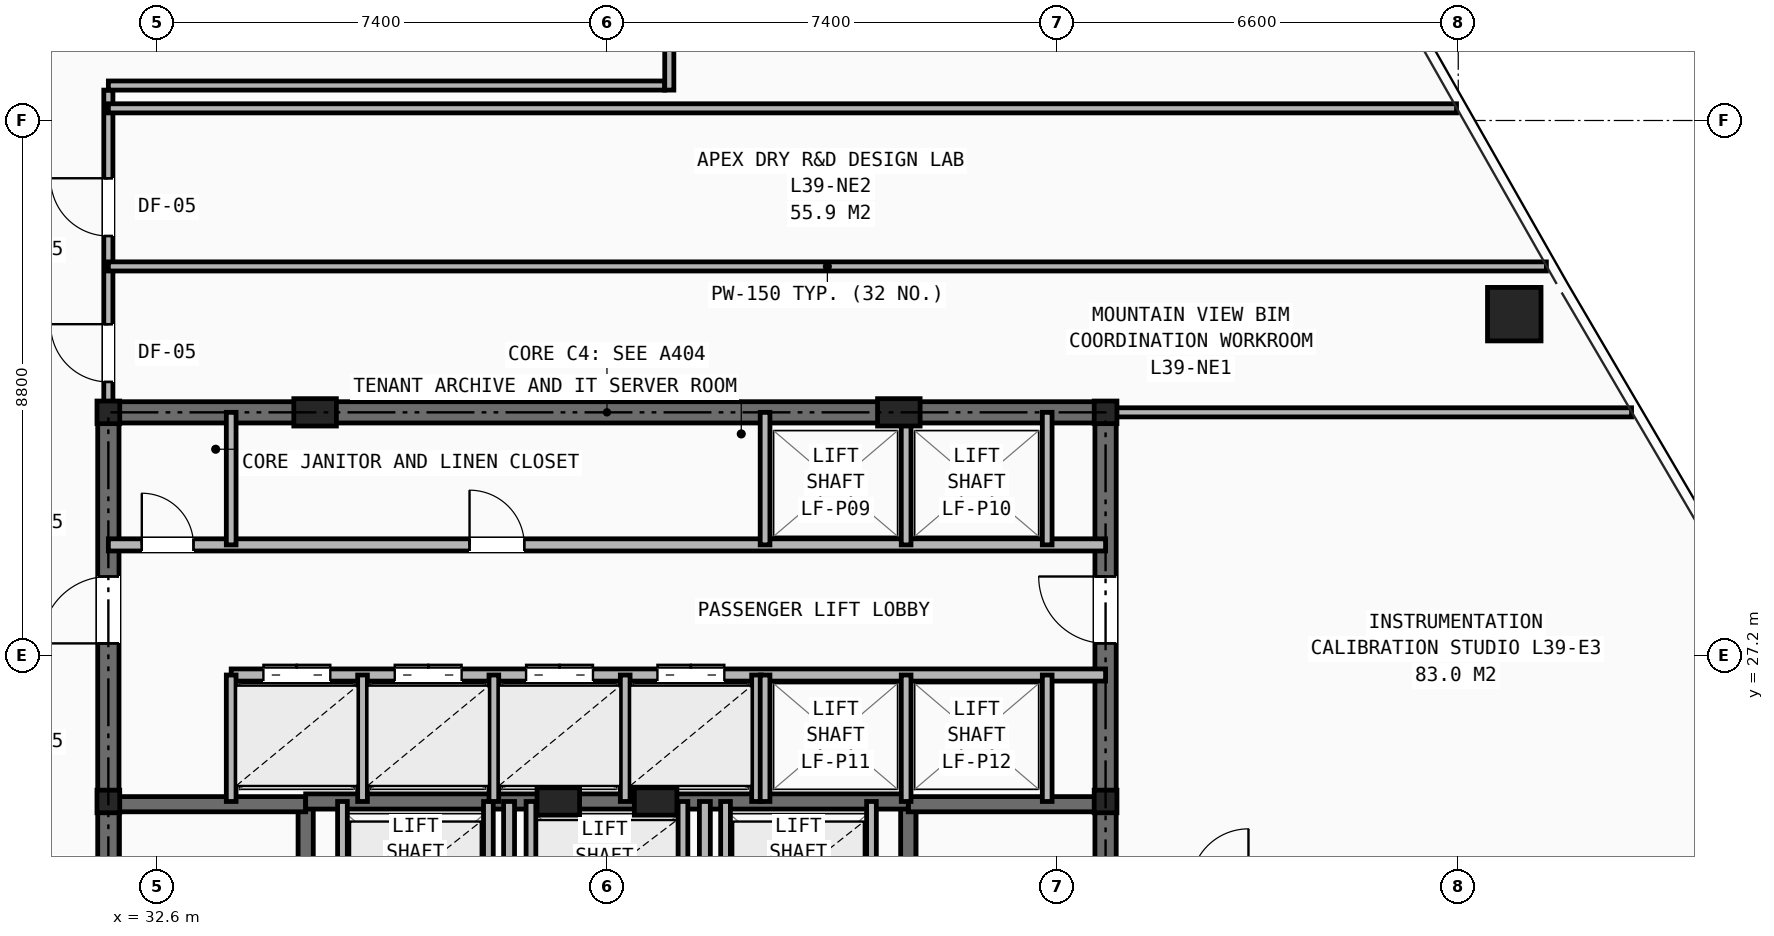
"""IFC4 building model, lengths in metres.
Left out: names, types, materials, properties, quantities, classifications, styles, units other than length and angle.
Written with IfcOpenShell. Run it as: python <this file> out.ifc"""

import sys

from ifc_helpers import new_model, si_unit, direction, frame, frame_2d, origin, origin_2d, place, context, subcontext, project, spatial, rectangle, hollow_rectangle, i_section, extrude, element, fill, save


model = new_model("IFC4")
c1 = context("Model", 3, precision=1e-05, world=origin(), true_north=direction((0.0, 1.0)))
c2 = subcontext(c1, "Body", "Model", "MODEL_VIEW")
j1 = project(units=[si_unit("LENGTHUNIT", "METRE"), si_unit("PLANEANGLEUNIT", "RADIAN")], contexts=[c1])
p1 = place(None, origin())
s1 = spatial("IfcSite", under=j1, at=p1, CompositionType="ELEMENT")
p2 = place(p1, origin())
s2 = spatial("IfcBuilding", under=s1, at=p2, CompositionType="ELEMENT")
p3 = place(p2, frame((0.0, 0.0, 136.7)))
s3 = spatial("IfcBuildingStorey", under=s2, at=p3, CompositionType="ELEMENT", Elevation=136.7)
for number, where, z_axis, x_axis in (
    (1, (31.8, 24.8, 0.0), (0.0, 0.0, 1.0), (1.0, 0.0, 0.0)),
    (2, (48.2, 24.8, 0.0), (0.0, 0.0, 1.0), (1.0, 0.0, 0.0)),
    (3, (31.8, 31.2, 0.0), (0.0, 0.0, 1.0), (1.0, 0.0, 0.0)),
    (4, (48.2, 31.2, 0.0), (0.0, 0.0, 1.0), (1.0, 0.0, 0.0)),
):
    element("IfcColumn", number, at=place(p3, frame(where, z_axis=z_axis, x_axis=x_axis)), inside=s3, PredefinedType="COLUMN", context=c2, shape_type="SweptSolid", body=[
        extrude(i_section(OverallWidth=0.374, OverallDepth=0.372, WebThickness=0.016, FlangeThickness=0.026, at=origin_2d()), origin(), (0.0, 0.0, 1.0), 3.45),
    ])
for number, where, z_axis, x_axis in (
    (5, (35.2, 31.2, 0.0), (0.0, 0.0, 1.0), (1.0, 0.0, 0.0)),
    (6, (44.8, 31.2, 0.0), (0.0, 0.0, 1.0), (1.0, 0.0, 0.0)),
    (7, (39.2, 24.8, 0.0), (0.0, 0.0, 1.0), (1.0, 0.0, 0.0)),
    (8, (40.8, 24.8, 0.0), (0.0, 0.0, 1.0), (1.0, 0.0, 0.0)),
):
    element("IfcColumn", number, at=place(p3, frame(where, z_axis=z_axis, x_axis=x_axis)), inside=s3, PredefinedType="PILASTER", context=c2, shape_type="SweptSolid", body=[
        extrude(rectangle(XDim=0.7, YDim=0.45, at=origin_2d()), origin(), (0.0, 0.0, 1.0), 3.45),
    ])
p4 = place(p3, frame((54.921, 32.815, 0.0), z_axis=(0.0, 0.0, 1.0), x_axis=(1.0, 0.0, 0.0)))
e9 = element("IfcColumn", 9, at=p4, inside=s3, PredefinedType="COLUMN", context=c2, shape_type="SweptSolid", body=[
    extrude(hollow_rectangle(XDim=0.88, YDim=0.88, WallThickness=0.06, at=origin_2d()), origin(), (0.0, 0.0, 1.0), 3.45),
])
p5 = place(p3, frame((31.8, 31.2, 0.0), z_axis=(0.0, 0.0, 1.0), x_axis=(1.0, 0.0, 0.0)))
e10 = element("IfcWall", 10, at=p5, inside=s3, PredefinedType="SHEAR", context=c2, shape_type="SweptSolid", body=[
    extrude(rectangle(XDim=16.4, YDim=0.35, at=frame_2d((8.2, 0.0))), origin(), (0.0, 0.0, 1.0), 3.21),
])
p6 = place(p3, frame((31.8, 16.4, 0.0), z_axis=(0.0, 0.0, 1.0), x_axis=(0.0, 1.0, 0.0)))
e11 = element("IfcWall", 11, at=p6, inside=s3, PredefinedType="SHEAR", context=c2, shape_type="SweptSolid", body=[
    extrude(rectangle(XDim=14.8, YDim=0.35, at=frame_2d((7.4, 0.0))), origin(), (0.0, 0.0, 1.0), 3.21),
])
p7 = place(p6, frame((11.0, 0.0, 0.0)))
e12 = element("IfcOpeningElement", 12, at=p7, cuts=e11, PredefinedType="OPENING", context=c2, shape_type="SweptSolid", body=[
    extrude(rectangle(XDim=1.1, YDim=2.15, at=frame_2d((0.55, 1.075))), frame((0.0, 0.185, 0.0), z_axis=(0.0, -1.0, 0.0), x_axis=(1.0, 0.0, 0.0)), (0.0, 0.0, 1.0), 0.37),
])
p8 = place(p3, frame((48.2, 16.4, 0.0), z_axis=(0.0, 0.0, 1.0), x_axis=(0.0, 1.0, 0.0)))
e13 = element("IfcWall", 13, at=p8, inside=s3, PredefinedType="SHEAR", context=c2, shape_type="SweptSolid", body=[
    extrude(rectangle(XDim=14.8, YDim=0.35, at=frame_2d((7.4, 0.0))), origin(), (0.0, 0.0, 1.0), 3.21),
])
p9 = place(p8, frame((11.0, 0.0, 0.0)))
e14 = element("IfcOpeningElement", 14, at=p9, cuts=e13, PredefinedType="OPENING", context=c2, shape_type="SweptSolid", body=[
    extrude(rectangle(XDim=1.1, YDim=2.15, at=frame_2d((0.55, 1.075))), frame((0.0, 0.185, 0.0), z_axis=(0.0, -1.0, 0.0), x_axis=(1.0, 0.0, 0.0)), (0.0, 0.0, 1.0), 0.37),
])
p10 = place(p3, frame((35.045, 16.4, 0.0), z_axis=(0.0, 0.0, 1.0), x_axis=(0.0, 1.0, 0.0)))
e15 = element("IfcWall", 15, at=p10, inside=s3, PredefinedType="SHEAR", context=c2, shape_type="SweptSolid", body=[
    extrude(rectangle(XDim=8.4, YDim=0.25, at=frame_2d((4.2, 0.0))), origin(), (0.0, 0.0, 1.0), 3.21),
])
p11 = place(p10, frame((0.45, 0.0, 0.0)))
e16 = element("IfcOpeningElement", 16, at=p11, cuts=e15, PredefinedType="OPENING", context=c2, shape_type="SweptSolid", body=[
    extrude(rectangle(XDim=0.95, YDim=2.1, at=frame_2d((0.475, 1.05))), frame((0.0, 0.135, 0.0), z_axis=(0.0, -1.0, 0.0), x_axis=(1.0, 0.0, 0.0)), (0.0, 0.0, 1.0), 0.27),
])
p12 = place(p3, frame((31.8, 24.755, 0.0), z_axis=(0.0, 0.0, 1.0), x_axis=(1.0, 0.0, 0.0)))
e17 = element("IfcWall", 17, at=p12, inside=s3, PredefinedType="SHEAR", context=c2, shape_type="SweptSolid", body=[
    extrude(rectangle(XDim=3.245, YDim=0.25, at=frame_2d((1.623, 0.0))), origin(), (0.0, 0.0, 1.0), 3.21),
])
p13 = place(p3, frame((44.955, 16.4, 0.0), z_axis=(0.0, 0.0, 1.0), x_axis=(0.0, 1.0, 0.0)))
e18 = element("IfcWall", 18, at=p13, inside=s3, PredefinedType="SHEAR", context=c2, shape_type="SweptSolid", body=[
    extrude(rectangle(XDim=8.4, YDim=0.25, at=frame_2d((4.2, 0.0))), origin(), (0.0, 0.0, 1.0), 3.21),
])
p14 = place(p13, frame((0.45, 0.0, 0.0)))
e19 = element("IfcOpeningElement", 19, at=p14, cuts=e18, PredefinedType="OPENING", context=c2, shape_type="SweptSolid", body=[
    extrude(rectangle(XDim=0.95, YDim=2.1, at=frame_2d((0.475, 1.05))), frame((0.0, 0.135, 0.0), z_axis=(0.0, -1.0, 0.0), x_axis=(1.0, 0.0, 0.0)), (0.0, 0.0, 1.0), 0.27),
])
p15 = place(p3, frame((44.955, 24.755, 0.0), z_axis=(0.0, 0.0, 1.0), x_axis=(1.0, 0.0, 0.0)))
e20 = element("IfcWall", 20, at=p15, inside=s3, PredefinedType="SHEAR", context=c2, shape_type="SweptSolid", body=[
    extrude(rectangle(XDim=3.245, YDim=0.25, at=frame_2d((1.623, 0.0))), origin(), (0.0, 0.0, 1.0), 3.21),
])
p16 = place(p3, frame((35.045, 24.8, 0.0), z_axis=(0.0, 0.0, 1.0), x_axis=(1.0, 0.0, 0.0)))
e21 = element("IfcWall", 21, at=p16, inside=s3, PredefinedType="SHEAR", context=c2, shape_type="SweptSolid", body=[
    extrude(rectangle(XDim=9.91, YDim=0.25, at=frame_2d((4.955, 0.0))), origin(), (0.0, 0.0, 1.0), 3.21),
])
p17 = place(p3, frame((38.39, 16.4, 0.0), z_axis=(0.0, 0.0, 1.0), x_axis=(0.0, 1.0, 0.0)))
e22 = element("IfcWall", 22, at=p17, inside=s3, PredefinedType="PARTITIONING", context=c2, shape_type="SweptSolid", body=[
    extrude(rectangle(XDim=8.4, YDim=0.18, at=frame_2d((4.2, 0.0))), origin(), (0.0, 0.0, 1.0), 2.661),
])
p18 = place(p17, frame((3.8, 0.0, 0.0)))
e23 = element("IfcOpeningElement", 23, at=p18, cuts=e22, PredefinedType="OPENING", context=c2, shape_type="SweptSolid", body=[
    extrude(rectangle(XDim=0.95, YDim=2.1, at=frame_2d((0.475, 1.05))), frame((0.0, 0.1, 0.0), z_axis=(0.0, -1.0, 0.0), x_axis=(1.0, 0.0, 0.0)), (0.0, 0.0, 1.0), 0.2),
])
p19 = place(p3, frame((41.61, 16.4, 0.0), z_axis=(0.0, 0.0, 1.0), x_axis=(0.0, 1.0, 0.0)))
e24 = element("IfcWall", 24, at=p19, inside=s3, PredefinedType="PARTITIONING", context=c2, shape_type="SweptSolid", body=[
    extrude(rectangle(XDim=8.4, YDim=0.18, at=frame_2d((4.2, 0.0))), origin(), (0.0, 0.0, 1.0), 2.661),
])
for number, where, z_axis, x_axis in (
    (25, (35.65, 22.48, 0.0), (0.0, 0.0, 1.0), (0.0, 1.0, 0.0)),
    (26, (38.05, 22.48, 0.0), (0.0, 0.0, 1.0), (0.0, 1.0, 0.0)),
    (27, (41.95, 22.48, 0.0), (0.0, 0.0, 1.0), (0.0, 1.0, 0.0)),
    (28, (44.35, 22.48, 0.0), (0.0, 0.0, 1.0), (0.0, 1.0, 0.0)),
    (29, (38.75, 22.48, 0.0), (0.0, 0.0, 1.0), (0.0, 1.0, 0.0)),
    (30, (41.25, 22.48, 0.0), (0.0, 0.0, 1.0), (0.0, 1.0, 0.0)),
):
    element("IfcWall", number, at=place(p3, frame(where, z_axis=z_axis, x_axis=x_axis)), inside=s3, PredefinedType="SOLIDWALL", context=c2, shape_type="SweptSolid", body=[
        extrude(rectangle(XDim=2.32, YDim=0.16, at=frame_2d((1.16, 0.0))), origin(), (0.0, 0.0, 1.0), 3.21),
    ])
p20 = place(p3, frame((31.8, 29.02, 0.0), z_axis=(0.0, 0.0, 1.0), x_axis=(1.0, 0.0, 0.0)))
e31 = element("IfcWall", 31, at=p20, inside=s3, PredefinedType="SOLIDWALL", context=c2, shape_type="SweptSolid", body=[
    extrude(rectangle(XDim=16.4, YDim=0.2, at=frame_2d((8.2, 0.0))), origin(), (0.0, 0.0, 1.0), 2.661),
])
p21 = place(p20, frame((0.55, 0.0, 0.0)))
e32 = element("IfcOpeningElement", 32, at=p21, cuts=e31, PredefinedType="OPENING", context=c2, shape_type="SweptSolid", body=[
    extrude(rectangle(XDim=0.85, YDim=2.05, at=frame_2d((0.425, 1.025))), frame((0.0, 0.11, 0.0), z_axis=(0.0, -1.0, 0.0), x_axis=(1.0, 0.0, 0.0)), (0.0, 0.0, 1.0), 0.22),
])
p22 = place(p20, frame((5.94, 0.0, 0.0)))
e33 = element("IfcOpeningElement", 33, at=p22, cuts=e31, PredefinedType="OPENING", context=c2, shape_type="SweptSolid", body=[
    extrude(rectangle(XDim=0.9, YDim=2.1, at=frame_2d((0.45, 1.05))), frame((0.0, 0.11, 0.0), z_axis=(0.0, -1.0, 0.0), x_axis=(1.0, 0.0, 0.0)), (0.0, 0.0, 1.0), 0.22),
])
p23 = place(p3, frame((33.82, 26.88, 0.0), z_axis=(0.0, 0.0, 1.0), x_axis=(1.0, 0.0, 0.0)))
e34 = element("IfcWall", 34, at=p23, inside=s3, PredefinedType="SOLIDWALL", context=c2, shape_type="SweptSolid", body=[
    extrude(rectangle(XDim=14.38, YDim=0.2, at=frame_2d((7.19, 0.0))), origin(), (0.0, 0.0, 1.0), 2.661),
])
p24 = place(p23, frame((0.53, 0.0, 0.0)))
e35 = element("IfcOpeningElement", 35, at=p24, cuts=e34, PredefinedType="OPENING", context=c2, shape_type="SweptSolid", body=[
    extrude(rectangle(XDim=1.1, YDim=2.15, at=frame_2d((0.55, 1.075))), frame((0.0, 0.11, 0.0), z_axis=(0.0, -1.0, 0.0), x_axis=(1.0, 0.0, 0.0)), (0.0, 0.0, 1.0), 0.22),
])
p25 = place(p23, frame((2.69, 0.0, 0.0)))
e36 = element("IfcOpeningElement", 36, at=p25, cuts=e34, PredefinedType="OPENING", context=c2, shape_type="SweptSolid", body=[
    extrude(rectangle(XDim=1.1, YDim=2.15, at=frame_2d((0.55, 1.075))), frame((0.0, 0.11, 0.0), z_axis=(0.0, -1.0, 0.0), x_axis=(1.0, 0.0, 0.0)), (0.0, 0.0, 1.0), 0.22),
])
p26 = place(p23, frame((4.85, 0.0, 0.0)))
e37 = element("IfcOpeningElement", 37, at=p26, cuts=e34, PredefinedType="OPENING", context=c2, shape_type="SweptSolid", body=[
    extrude(rectangle(XDim=1.1, YDim=2.15, at=frame_2d((0.55, 1.075))), frame((0.0, 0.11, 0.0), z_axis=(0.0, -1.0, 0.0), x_axis=(1.0, 0.0, 0.0)), (0.0, 0.0, 1.0), 0.22),
])
p27 = place(p23, frame((7.01, 0.0, 0.0)))
e38 = element("IfcOpeningElement", 38, at=p27, cuts=e34, PredefinedType="OPENING", context=c2, shape_type="SweptSolid", body=[
    extrude(rectangle(XDim=1.1, YDim=2.15, at=frame_2d((0.55, 1.075))), frame((0.0, 0.11, 0.0), z_axis=(0.0, -1.0, 0.0), x_axis=(1.0, 0.0, 0.0)), (0.0, 0.0, 1.0), 0.22),
])
p28 = place(p3, frame((33.82, 29.02, 0.0), z_axis=(0.0, 0.0, 1.0), x_axis=(0.0, 1.0, 0.0)))
e39 = element("IfcWall", 39, at=p28, inside=s3, PredefinedType="SOLIDWALL", context=c2, shape_type="SweptSolid", body=[
    extrude(rectangle(XDim=2.18, YDim=0.16, at=frame_2d((1.09, 0.0))), origin(), (0.0, 0.0, 1.0), 2.661),
])
for number, where, z_axis, x_axis in (
    (40, (33.82, 24.8, 0.0), (0.0, 0.0, 1.0), (0.0, 1.0, 0.0)),
    (41, (35.98, 24.8, 0.0), (0.0, 0.0, 1.0), (0.0, 1.0, 0.0)),
    (42, (38.14, 24.8, 0.0), (0.0, 0.0, 1.0), (0.0, 1.0, 0.0)),
    (43, (40.3, 24.8, 0.0), (0.0, 0.0, 1.0), (0.0, 1.0, 0.0)),
    (44, (42.46, 24.8, 0.0), (0.0, 0.0, 1.0), (0.0, 1.0, 0.0)),
):
    element("IfcWall", number, at=place(p3, frame(where, z_axis=z_axis, x_axis=x_axis)), inside=s3, PredefinedType="SOLIDWALL", context=c2, shape_type="SweptSolid", body=[
        extrude(rectangle(XDim=2.08, YDim=0.16, at=frame_2d((1.04, 0.0))), origin(), (0.0, 0.0, 1.0), 3.21),
    ])
for number, where, z_axis, x_axis in (
    (45, (42.6, 29.02, 0.0), (0.0, 0.0, 1.0), (0.0, 1.0, 0.0)),
    (46, (44.92, 29.02, 0.0), (0.0, 0.0, 1.0), (0.0, 1.0, 0.0)),
    (47, (47.24, 29.02, 0.0), (0.0, 0.0, 1.0), (0.0, 1.0, 0.0)),
):
    element("IfcWall", number, at=place(p3, frame(where, z_axis=z_axis, x_axis=x_axis)), inside=s3, PredefinedType="SOLIDWALL", context=c2, shape_type="SweptSolid", body=[
        extrude(rectangle(XDim=2.18, YDim=0.16, at=frame_2d((1.09, 0.0))), origin(), (0.0, 0.0, 1.0), 2.661),
    ])
for number, where, z_axis, x_axis in (
    (48, (42.6, 24.8, 0.0), (0.0, 0.0, 1.0), (0.0, 1.0, 0.0)),
    (49, (44.92, 24.8, 0.0), (0.0, 0.0, 1.0), (0.0, 1.0, 0.0)),
    (50, (47.24, 24.8, 0.0), (0.0, 0.0, 1.0), (0.0, 1.0, 0.0)),
):
    element("IfcWall", number, at=place(p3, frame(where, z_axis=z_axis, x_axis=x_axis)), inside=s3, PredefinedType="SOLIDWALL", context=c2, shape_type="SweptSolid", body=[
        extrude(rectangle(XDim=2.08, YDim=0.16, at=frame_2d((1.04, 0.0))), origin(), (0.0, 0.0, 1.0), 3.21),
    ])
p29 = place(p3, frame((31.8, 31.2, 0.0), z_axis=(0.0, 0.0, 1.0), x_axis=(0.0, 1.0, 0.0)))
e51 = element("IfcWall", 51, at=p29, inside=s3, PredefinedType="PARTITIONING", context=c2, shape_type="SweptSolid", body=[
    extrude(rectangle(XDim=5.3, YDim=0.15, at=frame_2d((2.65, 0.0))), origin(), (0.0, 0.0, 1.0), 2.225),
])
p30 = place(p29, frame((0.5, 0.0, 0.0)))
e52 = element("IfcOpeningElement", 52, at=p30, cuts=e51, PredefinedType="OPENING", context=c2, shape_type="SweptSolid", body=[
    extrude(rectangle(XDim=0.95, YDim=2.1, at=frame_2d((0.475, 1.05))), frame((0.0, 0.085, 0.0), z_axis=(0.0, -1.0, 0.0), x_axis=(1.0, 0.0, 0.0)), (0.0, 0.0, 1.0), 0.17),
])
p31 = place(p29, frame((2.9, 0.0, 0.0)))
e53 = element("IfcOpeningElement", 53, at=p31, cuts=e51, PredefinedType="OPENING", context=c2, shape_type="SweptSolid", body=[
    extrude(rectangle(XDim=0.95, YDim=2.1, at=frame_2d((0.475, 1.05))), frame((0.0, 0.085, 0.0), z_axis=(0.0, -1.0, 0.0), x_axis=(1.0, 0.0, 0.0)), (0.0, 0.0, 1.0), 0.17),
])
p32 = place(p3, frame((48.2, 31.2, 0.0), z_axis=(0.0, 0.0, 1.0), x_axis=(1.0, 0.0, 0.0)))
e54 = element("IfcWall", 54, at=p32, inside=s3, PredefinedType="PARTITIONING", context=c2, shape_type="SweptSolid", body=[
    extrude(rectangle(XDim=8.65, YDim=0.15, at=frame_2d((4.325, 0.0))), origin(), (0.0, 0.0, 1.0), 2.225),
])
p33 = place(p3, frame((31.8, 33.6, 0.0), z_axis=(0.0, 0.0, 1.0), x_axis=(1.0, 0.0, 0.0)))
e55 = element("IfcWall", 55, at=p33, inside=s3, PredefinedType="PARTITIONING", context=c2, shape_type="SweptSolid", body=[
    extrude(rectangle(XDim=23.649, YDim=0.15, at=frame_2d((11.825, 0.0))), origin(), (0.0, 0.0, 1.0), 2.589),
])
p34 = place(p3, frame((31.8, 36.2, 0.0), z_axis=(0.0, 0.0, 1.0), x_axis=(1.0, 0.0, 0.0)))
e56 = element("IfcWall", 56, at=p34, inside=s3, PredefinedType="PARTITIONING", context=c2, shape_type="SweptSolid", body=[
    extrude(rectangle(XDim=22.172, YDim=0.15, at=frame_2d((11.086, 0.0))), origin(), (0.0, 0.0, 1.0), 2.589),
])
p35 = place(p3, frame((31.8, 36.575, 0.0), z_axis=(0.0, 0.0, 1.0), x_axis=(1.0, 0.0, 0.0)))
e57 = element("IfcWall", 57, at=p35, inside=s3, PredefinedType="PARTITIONING", context=c2, shape_type="SweptSolid", body=[
    extrude(rectangle(XDim=9.15, YDim=0.15, at=frame_2d((4.575, 0.0))), origin(), (0.0, 0.0, 1.0), 3.21),
])
p36 = place(p3, frame((41.025, 36.5, 0.0), z_axis=(0.0, 0.0, 1.0), x_axis=(0.0, 1.0, 0.0)))
e58 = element("IfcWall", 58, at=p36, inside=s3, PredefinedType="PARTITIONING", context=c2, shape_type="SweptSolid", body=[
    extrude(rectangle(XDim=1.95, YDim=0.15, at=frame_2d((0.975, 0.0))), origin(), (0.0, 0.0, 1.0), 3.21),
])
p37 = place(p21, origin())
e59 = element("IfcDoor", 59, at=p37, inside=s3, OperationType="SINGLE_SWING_LEFT", PredefinedType="DOOR", context=c2, shape_type="SweptSolid", body=[
    extrude(rectangle(XDim=0.85, YDim=2.05, at=frame_2d((0.425, 1.025))), frame((0.0, 0.025, 0.0), z_axis=(0.0, -1.0, 0.0), x_axis=(1.0, 0.0, 0.0)), (0.0, 0.0, 1.0), 0.05),
])
fill(e32, e59)
p38 = place(p7, origin())
e60 = element("IfcDoor", 60, at=p38, inside=s3, OperationType="SINGLE_SWING_LEFT", PredefinedType="DOOR", context=c2, shape_type="SweptSolid", body=[
    extrude(rectangle(XDim=1.1, YDim=2.15, at=frame_2d((0.55, 1.075))), frame((0.0, 0.025, 0.0), z_axis=(0.0, -1.0, 0.0), x_axis=(1.0, 0.0, 0.0)), (0.0, 0.0, 1.0), 0.05),
])
fill(e12, e60)
p39 = place(p9, origin())
e61 = element("IfcDoor", 61, at=p39, inside=s3, OperationType="SINGLE_SWING_RIGHT", PredefinedType="DOOR", context=c2, shape_type="SweptSolid", body=[
    extrude(rectangle(XDim=1.1, YDim=2.15, at=frame_2d((0.55, 1.075))), frame((0.0, 0.025, 0.0), z_axis=(0.0, -1.0, 0.0), x_axis=(1.0, 0.0, 0.0)), (0.0, 0.0, 1.0), 0.05),
])
fill(e14, e61)
p40 = place(p22, origin())
e62 = element("IfcDoor", 62, at=p40, inside=s3, OperationType="SINGLE_SWING_LEFT", PredefinedType="DOOR", context=c2, shape_type="SweptSolid", body=[
    extrude(rectangle(XDim=0.9, YDim=2.1, at=frame_2d((0.45, 1.05))), frame((0.0, 0.025, 0.0), z_axis=(0.0, -1.0, 0.0), x_axis=(1.0, 0.0, 0.0)), (0.0, 0.0, 1.0), 0.05),
])
fill(e33, e62)
p41 = place(p24, origin())
e63 = element("IfcDoor", 63, at=p41, inside=s3, OperationType="DOUBLE_DOOR_SLIDING", PredefinedType="DOOR", context=c2, shape_type="SweptSolid", body=[
    extrude(rectangle(XDim=1.1, YDim=2.15, at=frame_2d((0.55, 1.075))), frame((0.0, 0.025, 0.0), z_axis=(0.0, -1.0, 0.0), x_axis=(1.0, 0.0, 0.0)), (0.0, 0.0, 1.0), 0.05),
])
fill(e35, e63)
p42 = place(p25, origin())
e64 = element("IfcDoor", 64, at=p42, inside=s3, OperationType="DOUBLE_DOOR_SLIDING", PredefinedType="DOOR", context=c2, shape_type="SweptSolid", body=[
    extrude(rectangle(XDim=1.1, YDim=2.15, at=frame_2d((0.55, 1.075))), frame((0.0, 0.025, 0.0), z_axis=(0.0, -1.0, 0.0), x_axis=(1.0, 0.0, 0.0)), (0.0, 0.0, 1.0), 0.05),
])
fill(e36, e64)
p43 = place(p26, origin())
e65 = element("IfcDoor", 65, at=p43, inside=s3, OperationType="DOUBLE_DOOR_SLIDING", PredefinedType="DOOR", context=c2, shape_type="SweptSolid", body=[
    extrude(rectangle(XDim=1.1, YDim=2.15, at=frame_2d((0.55, 1.075))), frame((0.0, 0.025, 0.0), z_axis=(0.0, -1.0, 0.0), x_axis=(1.0, 0.0, 0.0)), (0.0, 0.0, 1.0), 0.05),
])
fill(e37, e65)
p44 = place(p27, origin())
e66 = element("IfcDoor", 66, at=p44, inside=s3, OperationType="DOUBLE_DOOR_SLIDING", PredefinedType="DOOR", context=c2, shape_type="SweptSolid", body=[
    extrude(rectangle(XDim=1.1, YDim=2.15, at=frame_2d((0.55, 1.075))), frame((0.0, 0.025, 0.0), z_axis=(0.0, -1.0, 0.0), x_axis=(1.0, 0.0, 0.0)), (0.0, 0.0, 1.0), 0.05),
])
fill(e38, e66)
p45 = place(p30, origin())
e67 = element("IfcDoor", 67, at=p45, inside=s3, OperationType="SINGLE_SWING_RIGHT", PredefinedType="DOOR", context=c2, shape_type="SweptSolid", body=[
    extrude(rectangle(XDim=0.95, YDim=2.1, at=frame_2d((0.475, 1.05))), frame((0.0, 0.025, 0.0), z_axis=(0.0, -1.0, 0.0), x_axis=(1.0, 0.0, 0.0)), (0.0, 0.0, 1.0), 0.05),
])
fill(e52, e67)
p46 = place(p31, origin())
e68 = element("IfcDoor", 68, at=p46, inside=s3, OperationType="SINGLE_SWING_RIGHT", PredefinedType="DOOR", context=c2, shape_type="SweptSolid", body=[
    extrude(rectangle(XDim=0.95, YDim=2.1, at=frame_2d((0.475, 1.05))), frame((0.0, 0.025, 0.0), z_axis=(0.0, -1.0, 0.0), x_axis=(1.0, 0.0, 0.0)), (0.0, 0.0, 1.0), 0.05),
])
fill(e53, e68)
save(model, sys.argv[1])
